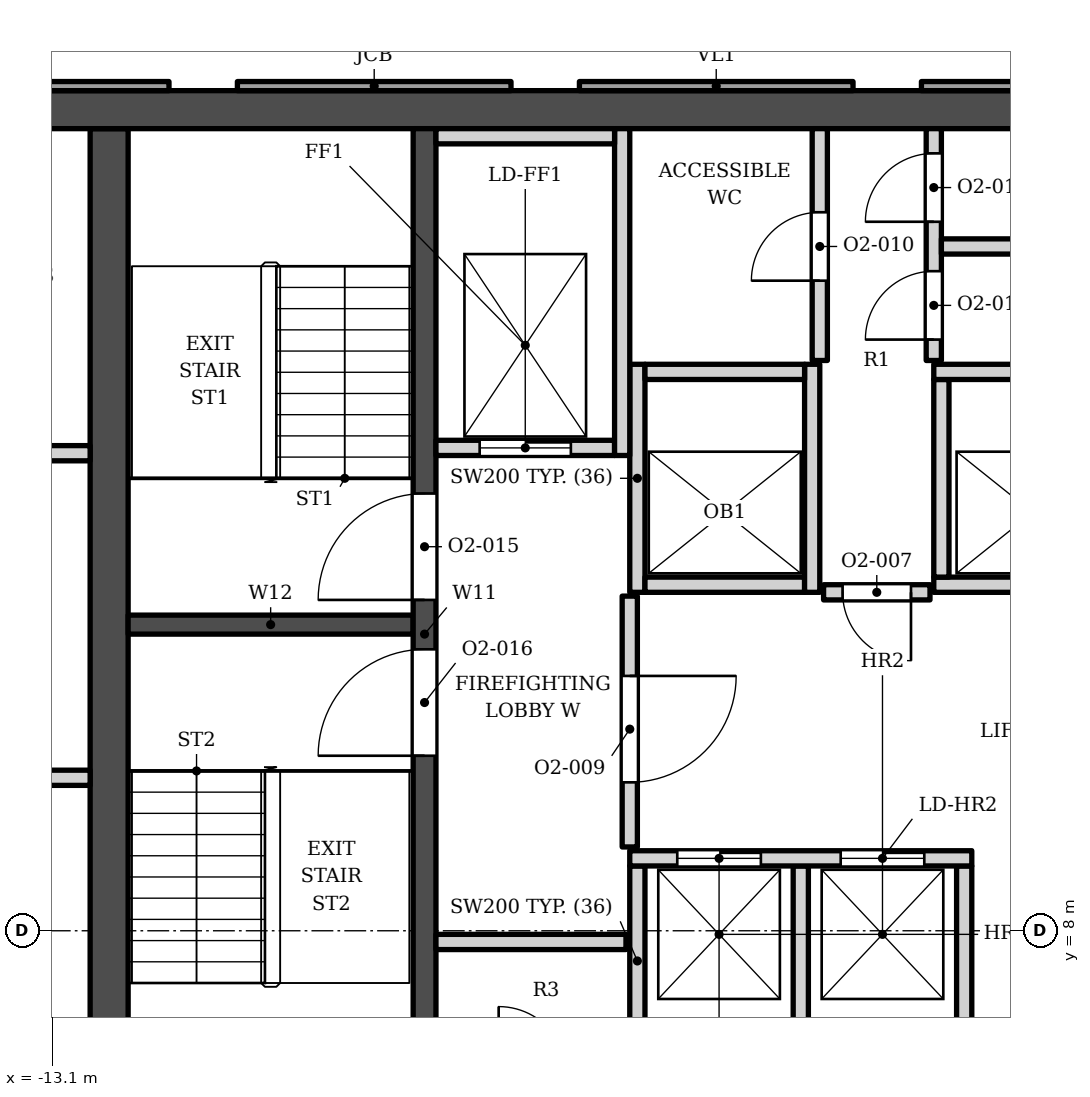
"""IFC4 building model, lengths in metres.
Left out: names, types, materials, properties, quantities, classifications, styles, units other than length and angle.
Written with IfcOpenShell. Run it as: python <this file> out.ifc"""

import sys

from ifc_helpers import new_model, si_unit, direction, frame, frame_2d, origin, place, context, subcontext, project, spatial, polyline, rectangle, outline, extrude, element, fill, save


model = new_model("IFC4")
c1 = context("Model", 3, precision=1e-05, world=origin(), true_north=direction((0.0, 1.0)))
c2 = subcontext(c1, "Body", "Model", "MODEL_VIEW")
j1 = project(units=[si_unit("LENGTHUNIT", "METRE"), si_unit("PLANEANGLEUNIT", "RADIAN")], contexts=[c1])
p1 = place(None, origin())
s1 = spatial("IfcSite", under=j1, at=p1, CompositionType="ELEMENT")
p2 = place(p1, origin())
s2 = spatial("IfcBuilding", under=s1, at=p2, CompositionType="ELEMENT")
p3 = place(p2, frame((0.0, 0.0, 156.3)))
s3 = spatial("IfcBuildingStorey", under=s2, at=p3, CompositionType="ELEMENT", Elevation=156.3)
p4 = place(p3, frame((-15.1, 18.802, 0.0), z_axis=(0.0, 0.0, 1.0), x_axis=(1.0, 0.0, 0.0)))
e1 = element("IfcWall", 1, at=p4, inside=s3, PredefinedType="SHEAR", context=c2, shape_type="SweptSolid", body=[
    extrude(rectangle(XDim=30.2, YDim=0.5, at=frame_2d((15.1, 0.0))), origin(), (0.0, 0.0, 1.0), 3.9),
])
p5 = place(p3, frame((-12.35, 5.253, 0.0), z_axis=(0.0, 0.0, 1.0), x_axis=(0.0, 1.0, 0.0)))
e2 = element("IfcWall", 2, at=p5, inside=s3, PredefinedType="SHEAR", context=c2, shape_type="SweptSolid", body=[
    extrude(rectangle(XDim=13.3, YDim=0.5, at=frame_2d((6.65, 0.0))), origin(), (0.0, 0.0, 1.0), 3.9),
])
p6 = place(p3, frame((-8.2, 5.253, 0.0), z_axis=(0.0, 0.0, 1.0), x_axis=(0.0, 1.0, 0.0)))
e3 = element("IfcWall", 3, at=p6, inside=s3, PredefinedType="SHEAR", context=c2, shape_type="SweptSolid", body=[
    extrude(rectangle(XDim=13.3, YDim=0.3, at=frame_2d((6.65, 0.0))), origin(), (0.0, 0.0, 1.0), 3.9),
])
p7 = place(p6, frame((7.1, 0.0, 0.0)))
e4 = element("IfcOpeningElement", 4, at=p7, cuts=e3, PredefinedType="OPENING", context=c2, shape_type="SweptSolid", body=[
    extrude(rectangle(XDim=1.4, YDim=2.1, at=frame_2d((0.7, 1.05))), frame((0.0, 0.16, 0.0), z_axis=(0.0, -1.0, 0.0), x_axis=(1.0, 0.0, 0.0)), (0.0, 0.0, 1.0), 0.32),
])
p8 = place(p6, frame((5.05, 0.0, 0.0)))
e5 = element("IfcOpeningElement", 5, at=p8, cuts=e3, PredefinedType="OPENING", context=c2, shape_type="SweptSolid", body=[
    extrude(rectangle(XDim=1.4, YDim=2.1, at=frame_2d((0.7, 1.05))), frame((0.0, 0.16, 0.0), z_axis=(0.0, -1.0, 0.0), x_axis=(1.0, 0.0, 0.0)), (0.0, 0.0, 1.0), 0.32),
])
p9 = place(p3, frame((-12.1, 12.028, 0.0), z_axis=(0.0, 0.0, 1.0), x_axis=(1.0, 0.0, 0.0)))
e6 = element("IfcWall", 6, at=p9, inside=s3, PredefinedType="SHEAR", context=c2, shape_type="SweptSolid", body=[
    extrude(rectangle(XDim=3.75, YDim=0.25, at=frame_2d((1.875, 0.0))), origin(), (0.0, 0.0, 1.0), 3.9),
])
p10 = place(p3, origin())
e7 = element("IfcWall", 7, at=p10, inside=s3, PredefinedType="SOLIDWALL", context=c2, shape_type="SweptSolid", body=[
    extrude(outline(polyline([(-1.663, 19.173), (-1.663, 19.052), (1.938, 19.052), (1.938, 19.173), (-1.663, 19.173)])), origin(), (0.0, 0.0, 1.0), 3.0),
])
p11 = place(p3, origin())
e8 = element("IfcWall", 8, at=p11, inside=s3, PredefinedType="ELEMENTEDWALL", context=c2, shape_type="SweptSolid", body=[
    extrude(outline(polyline([(-6.163, 19.173), (-6.163, 19.052), (-2.562, 19.052), (-2.562, 19.173), (-6.163, 19.173)])), origin(), (0.0, 0.0, 1.0), 3.0),
])
p12 = place(p3, origin())
e9 = element("IfcWall", 9, at=p12, inside=s3, PredefinedType="SOLIDWALL", context=c2, shape_type="SweptSolid", body=[
    extrude(outline(polyline([(-10.663, 19.173), (-10.663, 19.052), (-7.062, 19.052), (-7.062, 19.173), (-10.663, 19.173)])), origin(), (0.0, 0.0, 1.0), 3.0),
])
p13 = place(p3, origin())
e10 = element("IfcWall", 10, at=p13, inside=s3, PredefinedType="ELEMENTEDWALL", context=c2, shape_type="SweptSolid", body=[
    extrude(outline(polyline([(-15.163, 19.173), (-15.163, 19.052), (-11.562, 19.052), (-11.562, 19.173), (-15.163, 19.173)])), origin(), (0.0, 0.0, 1.0), 3.0),
])
for number, where, z_axis, x_axis in (
    (11, (-5.4, 6.353, 0.0), (0.0, 0.0, 1.0), (0.0, 1.0, 0.0)),
    (12, (-3.25, 6.353, 0.0), (0.0, 0.0, 1.0), (0.0, 1.0, 0.0)),
    (13, (-1.1, 6.353, 0.0), (0.0, 0.0, 1.0), (0.0, 1.0, 0.0)),
    (14, (-8.05, 7.853, 0.0), (0.0, 0.0, 1.0), (1.0, 0.0, 0.0)),
):
    element("IfcWall", number, at=place(p3, frame(where, z_axis=z_axis, x_axis=x_axis)), inside=s3, PredefinedType="SOLIDWALL", context=c2, shape_type="SweptSolid", body=[
        extrude(rectangle(XDim=2.5, YDim=0.2, at=frame_2d((1.25, 0.0))), origin(), (0.0, 0.0, 1.0), 3.73),
    ])
p14 = place(p3, frame((-5.5, 8.953, 0.0), z_axis=(0.0, 0.0, 1.0), x_axis=(1.0, 0.0, 0.0)))
e15 = element("IfcWall", 15, at=p14, inside=s3, PredefinedType="SOLIDWALL", context=c2, shape_type="SweptSolid", body=[
    extrude(rectangle(XDim=4.5, YDim=0.2, at=frame_2d((2.25, 0.0))), origin(), (0.0, 0.0, 1.0), 3.73),
])
p15 = place(p14, frame((0.625, 0.0, 0.0)))
e16 = element("IfcOpeningElement", 16, at=p15, cuts=e15, PredefinedType="OPENING", context=c2, shape_type="SweptSolid", body=[
    extrude(rectangle(XDim=1.1, YDim=2.1, at=frame_2d((0.55, 1.05))), frame((0.0, 0.11, 0.0), z_axis=(0.0, -1.0, 0.0), x_axis=(1.0, 0.0, 0.0)), (0.0, 0.0, 1.0), 0.22),
])
p16 = place(p14, frame((2.775, 0.0, 0.0)))
e17 = element("IfcOpeningElement", 17, at=p16, cuts=e15, PredefinedType="OPENING", context=c2, shape_type="SweptSolid", body=[
    extrude(rectangle(XDim=1.1, YDim=2.1, at=frame_2d((0.55, 1.05))), frame((0.0, 0.11, 0.0), z_axis=(0.0, -1.0, 0.0), x_axis=(1.0, 0.0, 0.0)), (0.0, 0.0, 1.0), 0.22),
])
p17 = place(p3, frame((-5.5, 9.103, 0.0), z_axis=(0.0, 0.0, 1.0), x_axis=(0.0, 1.0, 0.0)))
e18 = element("IfcWall", 18, at=p17, inside=s3, PredefinedType="SOLIDWALL", context=c2, shape_type="SweptSolid", body=[
    extrude(rectangle(XDim=3.3, YDim=0.2, at=frame_2d((1.65, 0.0))), origin(), (0.0, 0.0, 1.0), 3.73),
])
p18 = place(p17, frame((0.85, 0.0, 0.0)))
e19 = element("IfcOpeningElement", 19, at=p18, cuts=e18, PredefinedType="OPENING", context=c2, shape_type="SweptSolid", body=[
    extrude(rectangle(XDim=1.4, YDim=2.1, at=frame_2d((0.7, 1.05))), frame((0.0, 0.11, 0.0), z_axis=(0.0, -1.0, 0.0), x_axis=(1.0, 0.0, 0.0)), (0.0, 0.0, 1.0), 0.22),
])
p19 = place(p3, frame((-15.1, 10.013, 0.0), z_axis=(0.0, 0.0, 1.0), x_axis=(1.0, 0.0, 0.0)))
e20 = element("IfcWall", 20, at=p19, inside=s3, PredefinedType="PARTITIONING", context=c2, shape_type="SweptSolid", body=[
    extrude(rectangle(XDim=2.5, YDim=0.2, at=frame_2d((1.25, 0.0))), origin(), (0.0, 0.0, 1.0), 3.73),
])
p20 = place(p3, frame((-2.95, 12.453, 0.0), z_axis=(0.0, 0.0, 1.0), x_axis=(1.0, 0.0, 0.0)))
e21 = element("IfcWall", 21, at=p20, inside=s3, PredefinedType="SOLIDWALL", context=c2, shape_type="SweptSolid", body=[
    extrude(rectangle(XDim=1.4, YDim=0.2, at=frame_2d((0.7, 0.0))), origin(), (0.0, 0.0, 1.0), 3.73),
])
p21 = place(p20, frame((0.25, 0.0, 0.0)))
e22 = element("IfcOpeningElement", 22, at=p21, cuts=e21, PredefinedType="OPENING", context=c2, shape_type="SweptSolid", body=[
    extrude(rectangle(XDim=0.9, YDim=2.1, at=frame_2d((0.45, 1.05))), frame((0.0, 0.11, 0.0), z_axis=(0.0, -1.0, 0.0), x_axis=(1.0, 0.0, 0.0)), (0.0, 0.0, 1.0), 0.22),
])
p22 = place(p3, frame((-5.4, 12.453, 0.0), z_axis=(0.0, 0.0, 1.0), x_axis=(0.0, 1.0, 0.0)))
e23 = element("IfcWall", 23, at=p22, inside=s3, PredefinedType="SOLIDWALL", context=c2, shape_type="SweptSolid", body=[
    extrude(rectangle(XDim=3.0, YDim=0.2, at=frame_2d((1.5, 0.0))), origin(), (0.0, 0.0, 1.0), 3.73),
])
p23 = place(p3, frame((-5.3, 12.552, 0.0), z_axis=(0.0, 0.0, 1.0), x_axis=(1.0, 0.0, 0.0)))
e24 = element("IfcWall", 24, at=p23, inside=s3, PredefinedType="SOLIDWALL", context=c2, shape_type="SweptSolid", body=[
    extrude(rectangle(XDim=2.1, YDim=0.2, at=frame_2d((1.05, 0.0))), origin(), (0.0, 0.0, 1.0), 3.73),
])
p24 = place(p3, frame((-3.1, 12.453, 0.0), z_axis=(0.0, 0.0, 1.0), x_axis=(0.0, 1.0, 0.0)))
e25 = element("IfcWall", 25, at=p24, inside=s3, PredefinedType="SOLIDWALL", context=c2, shape_type="SweptSolid", body=[
    extrude(rectangle(XDim=3.0, YDim=0.2, at=frame_2d((1.5, 0.0))), origin(), (0.0, 0.0, 1.0), 3.73),
])
p25 = place(p3, frame((-1.5, 12.552, 0.0), z_axis=(0.0, 0.0, 1.0), x_axis=(1.0, 0.0, 0.0)))
e26 = element("IfcWall", 26, at=p25, inside=s3, PredefinedType="SOLIDWALL", context=c2, shape_type="SweptSolid", body=[
    extrude(rectangle(XDim=7.0, YDim=0.2, at=frame_2d((3.5, 0.0))), origin(), (0.0, 0.0, 1.0), 3.73),
])
p26 = place(p25, frame((3.075, 0.0, 0.0)))
e27 = element("IfcOpeningElement", 27, at=p26, cuts=e26, PredefinedType="OPENING", context=c2, shape_type="SweptSolid", body=[
    extrude(rectangle(XDim=1.1, YDim=2.1, at=frame_2d((0.55, 1.05))), frame((0.0, 0.11, 0.0), z_axis=(0.0, -1.0, 0.0), x_axis=(1.0, 0.0, 0.0)), (0.0, 0.0, 1.0), 0.22),
])
p27 = place(p25, frame((5.275, 0.0, 0.0)))
e28 = element("IfcOpeningElement", 28, at=p27, cuts=e26, PredefinedType="OPENING", context=c2, shape_type="SweptSolid", body=[
    extrude(rectangle(XDim=1.1, YDim=2.1, at=frame_2d((0.55, 1.05))), frame((0.0, 0.11, 0.0), z_axis=(0.0, -1.0, 0.0), x_axis=(1.0, 0.0, 0.0)), (0.0, 0.0, 1.0), 0.22),
])
p28 = place(p3, frame((-1.4, 12.653, 0.0), z_axis=(0.0, 0.0, 1.0), x_axis=(0.0, 1.0, 0.0)))
e29 = element("IfcWall", 29, at=p28, inside=s3, PredefinedType="SOLIDWALL", context=c2, shape_type="SweptSolid", body=[
    extrude(rectangle(XDim=2.6, YDim=0.2, at=frame_2d((1.3, 0.0))), origin(), (0.0, 0.0, 1.0), 3.73),
])
p29 = place(p3, frame((-15.1, 14.283, 0.0), z_axis=(0.0, 0.0, 1.0), x_axis=(1.0, 0.0, 0.0)))
e30 = element("IfcWall", 30, at=p29, inside=s3, PredefinedType="PARTITIONING", context=c2, shape_type="SweptSolid", body=[
    extrude(rectangle(XDim=2.5, YDim=0.2, at=frame_2d((1.25, 0.0))), origin(), (0.0, 0.0, 1.0), 3.73),
])
p30 = place(p3, frame((-8.05, 14.353, 0.0), z_axis=(0.0, 0.0, 1.0), x_axis=(1.0, 0.0, 0.0)))
e31 = element("IfcWall", 31, at=p30, inside=s3, PredefinedType="SOLIDWALL", context=c2, shape_type="SweptSolid", body=[
    extrude(rectangle(XDim=2.35, YDim=0.2, at=frame_2d((1.175, 0.0))), origin(), (0.0, 0.0, 1.0), 3.73),
])
p31 = place(p30, frame((0.575, 0.0, 0.0)))
e32 = element("IfcOpeningElement", 32, at=p31, cuts=e31, PredefinedType="OPENING", context=c2, shape_type="SweptSolid", body=[
    extrude(rectangle(XDim=1.2, YDim=2.1, at=frame_2d((0.6, 1.05))), frame((0.0, 0.11, 0.0), z_axis=(0.0, -1.0, 0.0), x_axis=(1.0, 0.0, 0.0)), (0.0, 0.0, 1.0), 0.22),
])
p32 = place(p3, frame((-5.6, 14.253, 0.0), z_axis=(0.0, 0.0, 1.0), x_axis=(0.0, 1.0, 0.0)))
e33 = element("IfcWall", 33, at=p32, inside=s3, PredefinedType="SOLIDWALL", context=c2, shape_type="SweptSolid", body=[
    extrude(rectangle(XDim=4.3, YDim=0.2, at=frame_2d((2.15, 0.0))), origin(), (0.0, 0.0, 1.0), 3.73),
])
p33 = place(p3, frame((-5.3, 15.353, 0.0), z_axis=(0.0, 0.0, 1.0), x_axis=(1.0, 0.0, 0.0)))
e34 = element("IfcWall", 34, at=p33, inside=s3, PredefinedType="SOLIDWALL", context=c2, shape_type="SweptSolid", body=[
    extrude(rectangle(XDim=2.1, YDim=0.2, at=frame_2d((1.05, 0.0))), origin(), (0.0, 0.0, 1.0), 3.73),
])
p34 = place(p3, frame((-1.5, 15.353, 0.0), z_axis=(0.0, 0.0, 1.0), x_axis=(1.0, 0.0, 0.0)))
e35 = element("IfcWall", 35, at=p34, inside=s3, PredefinedType="SOLIDWALL", context=c2, shape_type="SweptSolid", body=[
    extrude(rectangle(XDim=7.2, YDim=0.2, at=frame_2d((3.6, 0.0))), origin(), (0.0, 0.0, 1.0), 3.73),
])
p35 = place(p3, frame((-3.0, 15.503, 0.0), z_axis=(0.0, 0.0, 1.0), x_axis=(0.0, 1.0, 0.0)))
e36 = element("IfcWall", 36, at=p35, inside=s3, PredefinedType="SOLIDWALL", context=c2, shape_type="SweptSolid", body=[
    extrude(rectangle(XDim=3.05, YDim=0.2, at=frame_2d((1.525, 0.0))), origin(), (0.0, 0.0, 1.0), 3.73),
])
p36 = place(p35, frame((1.05, 0.0, 0.0)))
e37 = element("IfcOpeningElement", 37, at=p36, cuts=e36, PredefinedType="OPENING", context=c2, shape_type="SweptSolid", body=[
    extrude(rectangle(XDim=0.9, YDim=2.1, at=frame_2d((0.45, 1.05))), frame((0.0, 0.11, 0.0), z_axis=(0.0, -1.0, 0.0), x_axis=(1.0, 0.0, 0.0)), (0.0, 0.0, 1.0), 0.22),
])
p37 = place(p3, frame((-1.5, 15.503, 0.0), z_axis=(0.0, 0.0, 1.0), x_axis=(0.0, 1.0, 0.0)))
e38 = element("IfcWall", 38, at=p37, inside=s3, PredefinedType="SOLIDWALL", context=c2, shape_type="SweptSolid", body=[
    extrude(rectangle(XDim=3.05, YDim=0.2, at=frame_2d((1.525, 0.0))), origin(), (0.0, 0.0, 1.0), 3.73),
])
p38 = place(p37, frame((0.275, 0.0, 0.0)))
e39 = element("IfcOpeningElement", 39, at=p38, cuts=e38, PredefinedType="OPENING", context=c2, shape_type="SweptSolid", body=[
    extrude(rectangle(XDim=0.9, YDim=2.1, at=frame_2d((0.45, 1.05))), frame((0.0, 0.11, 0.0), z_axis=(0.0, -1.0, 0.0), x_axis=(1.0, 0.0, 0.0)), (0.0, 0.0, 1.0), 0.22),
])
p39 = place(p37, frame((1.825, 0.0, 0.0)))
e40 = element("IfcOpeningElement", 40, at=p39, cuts=e38, PredefinedType="OPENING", context=c2, shape_type="SweptSolid", body=[
    extrude(rectangle(XDim=0.9, YDim=2.1, at=frame_2d((0.45, 1.05))), frame((0.0, 0.11, 0.0), z_axis=(0.0, -1.0, 0.0), x_axis=(1.0, 0.0, 0.0)), (0.0, 0.0, 1.0), 0.22),
])
p40 = place(p3, frame((-1.4, 17.003, 0.0), z_axis=(0.0, 0.0, 1.0), x_axis=(1.0, 0.0, 0.0)))
e41 = element("IfcWall", 41, at=p40, inside=s3, PredefinedType="SOLIDWALL", context=c2, shape_type="SweptSolid", body=[
    extrude(rectangle(XDim=6.85, YDim=0.2, at=frame_2d((3.425, 0.0))), origin(), (0.0, 0.0, 1.0), 3.73),
])
p41 = place(p3, frame((-8.05, 18.453, 0.0), z_axis=(0.0, 0.0, 1.0), x_axis=(1.0, 0.0, 0.0)))
e42 = element("IfcWall", 42, at=p41, inside=s3, PredefinedType="SOLIDWALL", context=c2, shape_type="SweptSolid", body=[
    extrude(rectangle(XDim=2.35, YDim=0.2, at=frame_2d((1.175, 0.0))), origin(), (0.0, 0.0, 1.0), 3.73),
])
p42 = place(p15, origin())
e43 = element("IfcDoor", 43, at=p42, inside=s3, OperationType="DOUBLE_DOOR_SLIDING", PredefinedType="DOOR", context=c2, shape_type="SweptSolid", body=[
    extrude(rectangle(XDim=1.1, YDim=2.1, at=frame_2d((0.55, 1.05))), frame((0.0, 0.025, 0.0), z_axis=(0.0, -1.0, 0.0), x_axis=(1.0, 0.0, 0.0)), (0.0, 0.0, 1.0), 0.05),
])
fill(e16, e43)
p43 = place(p16, origin())
e44 = element("IfcDoor", 44, at=p43, inside=s3, OperationType="DOUBLE_DOOR_SLIDING", PredefinedType="DOOR", context=c2, shape_type="SweptSolid", body=[
    extrude(rectangle(XDim=1.1, YDim=2.1, at=frame_2d((0.55, 1.05))), frame((0.0, 0.025, 0.0), z_axis=(0.0, -1.0, 0.0), x_axis=(1.0, 0.0, 0.0)), (0.0, 0.0, 1.0), 0.05),
])
fill(e17, e44)
p44 = place(p31, origin())
e45 = element("IfcDoor", 45, at=p44, inside=s3, OperationType="DOUBLE_DOOR_SLIDING", PredefinedType="DOOR", context=c2, shape_type="SweptSolid", body=[
    extrude(rectangle(XDim=1.2, YDim=2.1, at=frame_2d((0.6, 1.05))), frame((0.0, 0.025, 0.0), z_axis=(0.0, -1.0, 0.0), x_axis=(1.0, 0.0, 0.0)), (0.0, 0.0, 1.0), 0.05),
])
fill(e32, e45)
p45 = place(p7, origin())
e46 = element("IfcDoor", 46, at=p45, inside=s3, OperationType="SINGLE_SWING_LEFT", PredefinedType="DOOR", context=c2, shape_type="SweptSolid", body=[
    extrude(rectangle(XDim=1.4, YDim=2.1, at=frame_2d((0.7, 1.05))), frame((0.0, 0.025, 0.0), z_axis=(0.0, -1.0, 0.0), x_axis=(1.0, 0.0, 0.0)), (0.0, 0.0, 1.0), 0.05),
])
fill(e4, e46)
p46 = place(p8, origin())
e47 = element("IfcDoor", 47, at=p46, inside=s3, OperationType="SINGLE_SWING_LEFT", PredefinedType="DOOR", context=c2, shape_type="SweptSolid", body=[
    extrude(rectangle(XDim=1.4, YDim=2.1, at=frame_2d((0.7, 1.05))), frame((0.0, 0.025, 0.0), z_axis=(0.0, -1.0, 0.0), x_axis=(1.0, 0.0, 0.0)), (0.0, 0.0, 1.0), 0.05),
])
fill(e5, e47)
p47 = place(p21, origin())
e48 = element("IfcDoor", 48, at=p47, inside=s3, OperationType="SINGLE_SWING_RIGHT", PredefinedType="DOOR", context=c2, shape_type="SweptSolid", body=[
    extrude(rectangle(XDim=0.9, YDim=2.1, at=frame_2d((0.45, 1.05))), frame((0.0, 0.025, 0.0), z_axis=(0.0, -1.0, 0.0), x_axis=(1.0, 0.0, 0.0)), (0.0, 0.0, 1.0), 0.05),
])
fill(e22, e48)
p48 = place(p18, origin())
e49 = element("IfcDoor", 49, at=p48, inside=s3, OperationType="SINGLE_SWING_RIGHT", PredefinedType="DOOR", context=c2, shape_type="SweptSolid", body=[
    extrude(rectangle(XDim=1.4, YDim=2.1, at=frame_2d((0.7, 1.05))), frame((0.0, 0.025, 0.0), z_axis=(0.0, -1.0, 0.0), x_axis=(1.0, 0.0, 0.0)), (0.0, 0.0, 1.0), 0.05),
])
fill(e19, e49)
p49 = place(p36, origin())
e50 = element("IfcDoor", 50, at=p49, inside=s3, OperationType="SINGLE_SWING_LEFT", PredefinedType="DOOR", context=c2, shape_type="SweptSolid", body=[
    extrude(rectangle(XDim=0.9, YDim=2.1, at=frame_2d((0.45, 1.05))), frame((0.0, 0.025, 0.0), z_axis=(0.0, -1.0, 0.0), x_axis=(1.0, 0.0, 0.0)), (0.0, 0.0, 1.0), 0.05),
])
fill(e37, e50)
p50 = place(p38, origin())
e51 = element("IfcDoor", 51, at=p50, inside=s3, OperationType="SINGLE_SWING_LEFT", PredefinedType="DOOR", context=c2, shape_type="SweptSolid", body=[
    extrude(rectangle(XDim=0.9, YDim=2.1, at=frame_2d((0.45, 1.05))), frame((0.0, 0.025, 0.0), z_axis=(0.0, -1.0, 0.0), x_axis=(1.0, 0.0, 0.0)), (0.0, 0.0, 1.0), 0.05),
])
fill(e39, e51)
p51 = place(p39, origin())
e52 = element("IfcDoor", 52, at=p51, inside=s3, OperationType="SINGLE_SWING_LEFT", PredefinedType="DOOR", context=c2, shape_type="SweptSolid", body=[
    extrude(rectangle(XDim=0.9, YDim=2.1, at=frame_2d((0.45, 1.05))), frame((0.0, 0.025, 0.0), z_axis=(0.0, -1.0, 0.0), x_axis=(1.0, 0.0, 0.0)), (0.0, 0.0, 1.0), 0.05),
])
fill(e40, e52)
save(model, sys.argv[1])
